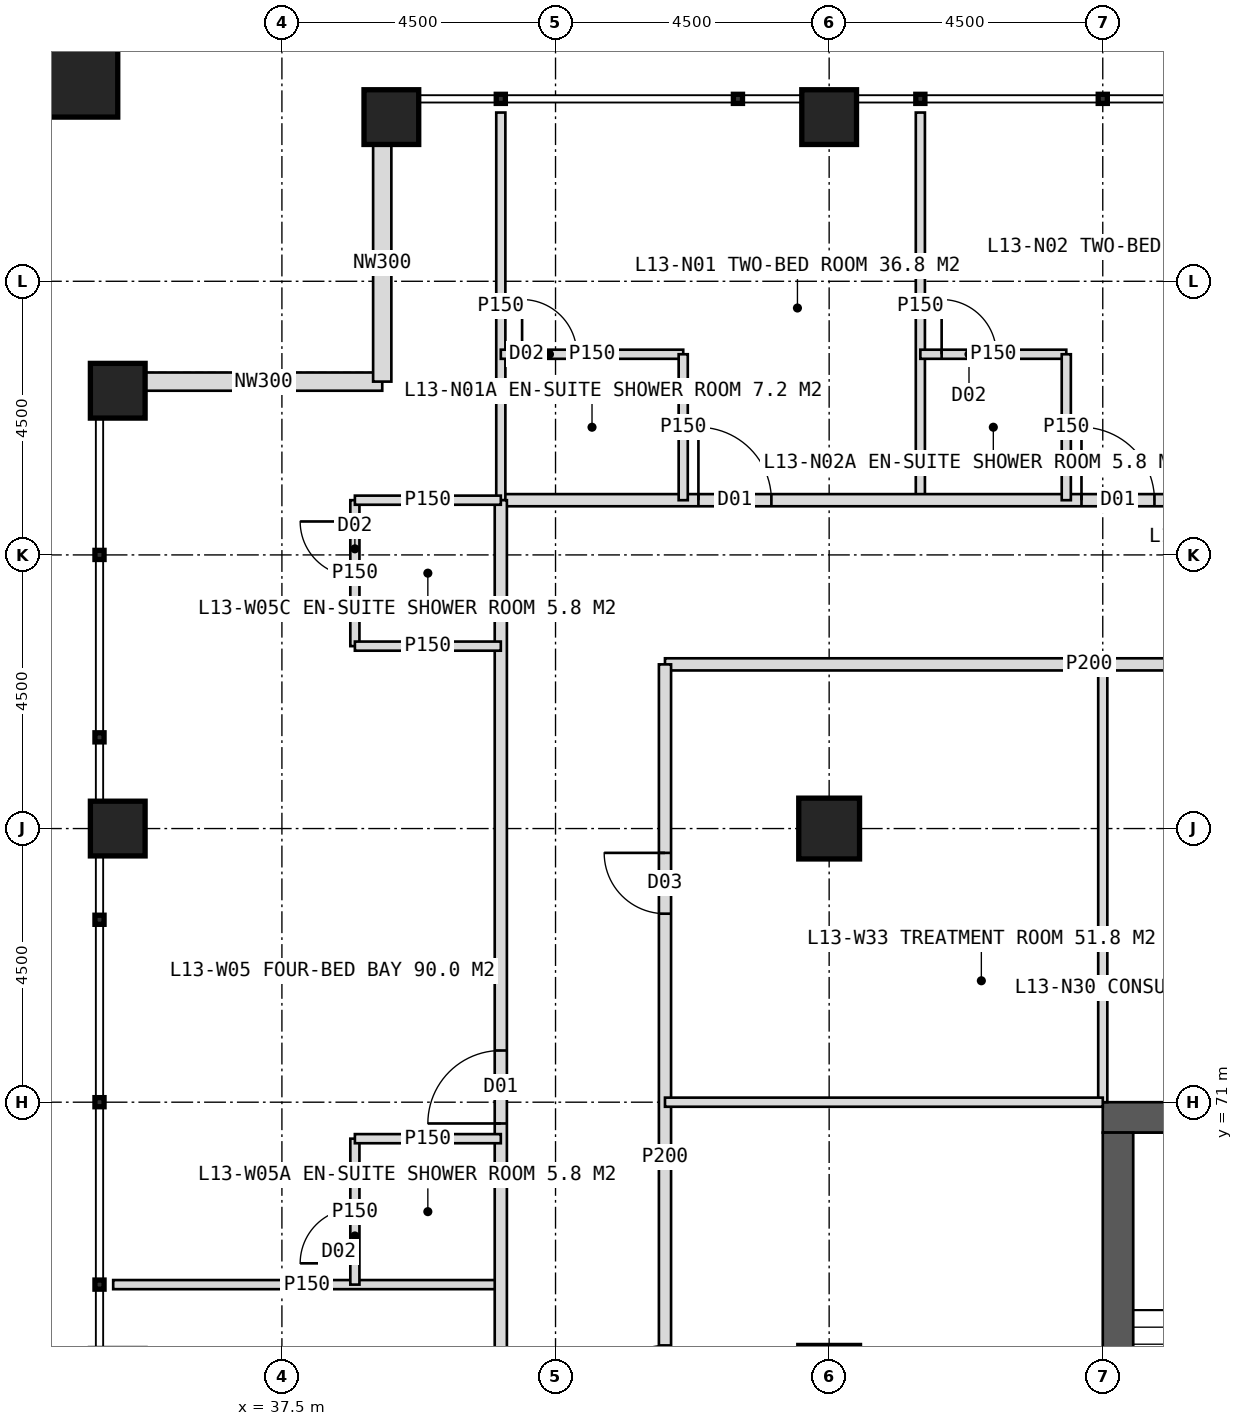
"""IFC4 building model, lengths in metres.
Left out: names, types, materials, properties, quantities, classifications, styles, units other than length and angle.
Written with IfcOpenShell. Run it as: python <this file> out.ifc"""

import sys

from ifc_helpers import new_model, si_unit, direction, frame, frame_2d, origin, origin_2d, place, context, subcontext, project, spatial, rectangle, hollow_rectangle, extrude, element, fill, save


model = new_model("IFC4")
c1 = context("Model", 3, precision=1e-05, world=origin(), true_north=direction((0.0, 1.0)))
c2 = subcontext(c1, "Body", "Model", "MODEL_VIEW")
j1 = project(units=[si_unit("LENGTHUNIT", "METRE"), si_unit("PLANEANGLEUNIT", "RADIAN")], contexts=[c1])
p1 = place(None, origin())
s1 = spatial("IfcSite", under=j1, at=p1, CompositionType="ELEMENT")
p2 = place(p1, origin())
s2 = spatial("IfcBuilding", under=s1, at=p2, CompositionType="ELEMENT")
p3 = place(p2, frame((0.0, 0.0, 59.0)))
s3 = spatial("IfcBuildingStorey", under=s2, at=p3, CompositionType="ELEMENT", Elevation=59.0)
p4 = place(p3, frame((51.0, 70.75, 0.0), z_axis=(0.0, 0.0, 1.0), x_axis=(1.0, 0.0, 0.0)))
e1 = element("IfcWall", 1, at=p4, inside=s3, PredefinedType="SHEAR", context=c2, shape_type="SweptSolid", body=[
    extrude(rectangle(XDim=18.0, YDim=0.5, at=frame_2d((9.0, 0.0))), origin(), (0.0, 0.0, 1.0), 4.0),
])
p5 = place(p4, frame((8.1, 0.0, 0.0)))
e2 = element("IfcOpeningElement", 2, at=p5, cuts=e1, PredefinedType="OPENING", context=c2, shape_type="SweptSolid", body=[
    extrude(rectangle(XDim=1.8, YDim=2.2, at=frame_2d((0.9, 1.1))), frame((0.0, 0.26, 0.0), z_axis=(0.0, -1.0, 0.0), x_axis=(1.0, 0.0, 0.0)), (0.0, 0.0, 1.0), 0.52),
])
p6 = place(p3, frame((51.25, 53.5, 0.0), z_axis=(0.0, 0.0, 1.0), x_axis=(0.0, 1.0, 0.0)))
e3 = element("IfcWall", 3, at=p6, inside=s3, PredefinedType="SHEAR", context=c2, shape_type="SweptSolid", body=[
    extrude(rectangle(XDim=17.0, YDim=0.5, at=frame_2d((8.5, 0.0))), origin(), (0.0, 0.0, 1.0), 4.0),
])
p7 = place(p6, frame((6.0, 0.0, 0.0)))
e4 = element("IfcOpeningElement", 4, at=p7, cuts=e3, PredefinedType="OPENING", context=c2, shape_type="SweptSolid", body=[
    extrude(rectangle(XDim=1.5, YDim=2.2, at=frame_2d((0.75, 1.1))), frame((0.0, 0.26, 0.0), z_axis=(0.0, -1.0, 0.0), x_axis=(1.0, 0.0, 0.0)), (0.0, 0.0, 1.0), 0.52),
])
p8 = place(p3, frame((46.5, 75.5, 0.0), z_axis=(0.0, 0.0, 1.0), x_axis=(1.0, 0.0, 0.0)))
e5 = element("IfcColumn", 5, at=p8, inside=s3, PredefinedType="COLUMN", context=c2, shape_type="SweptSolid", body=[
    extrude(hollow_rectangle(XDim=1.0, YDim=1.0, WallThickness=0.1, at=origin_2d()), origin(), (0.0, 0.0, 1.0), 4.0),
])
for number, where, z_axis, x_axis in (
    (6, (39.3, 87.2, 0.0), (0.0, 0.0, 1.0), (1.0, 0.0, 0.0)),
    (7, (46.5, 87.2, 0.0), (0.0, 0.0, 1.0), (1.0, 0.0, 0.0)),
    (8, (34.8, 75.5, 0.0), (0.0, 0.0, 1.0), (1.0, 0.0, 0.0)),
    (9, (34.8, 82.7, 0.0), (0.0, 0.0, 1.0), (1.0, 0.0, 0.0)),
):
    element("IfcColumn", number, at=place(p3, frame(where, z_axis=z_axis, x_axis=x_axis)), inside=s3, PredefinedType="COLUMN", context=c2, shape_type="SweptSolid", body=[
        extrude(hollow_rectangle(XDim=0.9, YDim=0.9, WallThickness=0.08, at=origin_2d()), origin(), (0.0, 0.0, 1.0), 4.0),
    ])
p9 = place(p3, frame((33.9, 88.1, 0.0), z_axis=(0.0, 0.0, 1.0), x_axis=(1.0, 0.0, 0.0)))
e10 = element("IfcColumn", 10, at=p9, inside=s3, PredefinedType="COLUMN", context=c2, shape_type="SweptSolid", body=[
    extrude(hollow_rectangle(XDim=1.8, YDim=1.8, WallThickness=0.1, at=origin_2d()), origin(), (0.0, 0.0, 1.0), 4.0),
])
for number, where, z_axis, x_axis in (
    (11, (35.25, 82.85, 0.0), (0.0, 0.0, 1.0), (1.0, 0.0, 0.0)),
    (12, (39.15, 82.85, 0.0), (0.0, 0.0, 1.0), (0.0, 1.0, 0.0)),
):
    element("IfcWall", number, at=place(p3, frame(where, z_axis=z_axis, x_axis=x_axis)), inside=s3, PredefinedType="ELEMENTEDWALL", context=c2, shape_type="SweptSolid", body=[
        extrude(rectangle(XDim=3.9, YDim=0.3, at=frame_2d((1.95, 0.0))), origin(), (0.0, 0.0, 1.0), 2.95),
    ])
p10 = place(p3, frame((48.0, 80.9, 0.0), z_axis=(0.0, 0.0, 1.0), x_axis=(0.0, 1.0, 0.0)))
e13 = element("IfcWall", 13, at=p10, inside=s3, PredefinedType="PARTITIONING", context=c2, shape_type="SweptSolid", body=[
    extrude(rectangle(XDim=6.375, YDim=0.15, at=frame_2d((3.188, 0.0))), origin(), (0.0, 0.0, 1.0), 3.75),
])
p11 = place(p3, frame((41.1, 80.9, 0.0), z_axis=(0.0, 0.0, 1.0), x_axis=(1.0, 0.0, 0.0)))
e14 = element("IfcWall", 14, at=p11, inside=s3, PredefinedType="PARTITIONING", context=c2, shape_type="SweptSolid", body=[
    extrude(rectangle(XDim=37.8, YDim=0.2, at=frame_2d((18.9, 0.0))), origin(), (0.0, 0.0, 1.0), 3.75),
])
p12 = place(p11, frame((3.25, 0.0, 0.0)))
e15 = element("IfcOpeningElement", 15, at=p12, cuts=e14, PredefinedType="OPENING", context=c2, shape_type="SweptSolid", body=[
    extrude(rectangle(XDim=1.2, YDim=2.2, at=frame_2d((0.6, 1.1))), frame((0.0, 0.11, 0.0), z_axis=(0.0, -1.0, 0.0), x_axis=(1.0, 0.0, 0.0)), (0.0, 0.0, 1.0), 0.22),
])
p13 = place(p11, frame((9.55, 0.0, 0.0)))
e16 = element("IfcOpeningElement", 16, at=p13, cuts=e14, PredefinedType="OPENING", context=c2, shape_type="SweptSolid", body=[
    extrude(rectangle(XDim=1.2, YDim=2.2, at=frame_2d((0.6, 1.1))), frame((0.0, 0.11, 0.0), z_axis=(0.0, -1.0, 0.0), x_axis=(1.0, 0.0, 0.0)), (0.0, 0.0, 1.0), 0.22),
])
p14 = place(p11, frame((15.55, 0.0, 0.0)))
e17 = element("IfcOpeningElement", 17, at=p14, cuts=e14, PredefinedType="OPENING", context=c2, shape_type="SweptSolid", body=[
    extrude(rectangle(XDim=1.2, YDim=2.2, at=frame_2d((0.6, 1.1))), frame((0.0, 0.11, 0.0), z_axis=(0.0, -1.0, 0.0), x_axis=(1.0, 0.0, 0.0)), (0.0, 0.0, 1.0), 0.22),
])
p15 = place(p11, frame((21.4, 0.0, 0.0)))
e18 = element("IfcOpeningElement", 18, at=p15, cuts=e14, PredefinedType="OPENING", context=c2, shape_type="SweptSolid", body=[
    extrude(rectangle(XDim=1.0, YDim=2.1, at=frame_2d((0.5, 1.05))), frame((0.0, 0.11, 0.0), z_axis=(0.0, -1.0, 0.0), x_axis=(1.0, 0.0, 0.0)), (0.0, 0.0, 1.0), 0.22),
])
p16 = place(p11, frame((27.55, 0.0, 0.0)))
e19 = element("IfcOpeningElement", 19, at=p16, cuts=e14, PredefinedType="OPENING", context=c2, shape_type="SweptSolid", body=[
    extrude(rectangle(XDim=1.2, YDim=2.2, at=frame_2d((0.6, 1.1))), frame((0.0, 0.11, 0.0), z_axis=(0.0, -1.0, 0.0), x_axis=(1.0, 0.0, 0.0)), (0.0, 0.0, 1.0), 0.22),
])
p17 = place(p3, frame((41.1, 80.9, 0.0), z_axis=(0.0, 0.0, 1.0), x_axis=(0.0, 1.0, 0.0)))
e20 = element("IfcWall", 20, at=p17, inside=s3, PredefinedType="PARTITIONING", context=c2, shape_type="SweptSolid", body=[
    extrude(rectangle(XDim=6.375, YDim=0.15, at=frame_2d((3.188, 0.0))), origin(), (0.0, 0.0, 1.0), 3.75),
])
p18 = place(p3, frame((41.1, 83.3, 0.0), z_axis=(0.0, 0.0, 1.0), x_axis=(1.0, 0.0, 0.0)))
e21 = element("IfcWall", 21, at=p18, inside=s3, PredefinedType="PARTITIONING", context=c2, shape_type="SweptSolid", body=[
    extrude(rectangle(XDim=3.0, YDim=0.15, at=frame_2d((1.5, 0.0))), origin(), (0.0, 0.0, 1.0), 3.75),
])
p19 = place(p18, frame((0.35, 0.0, 0.0)))
e22 = element("IfcOpeningElement", 22, at=p19, cuts=e21, PredefinedType="OPENING", context=c2, shape_type="SweptSolid", body=[
    extrude(rectangle(XDim=0.9, YDim=2.1, at=frame_2d((0.45, 1.05))), frame((0.0, 0.085, 0.0), z_axis=(0.0, -1.0, 0.0), x_axis=(1.0, 0.0, 0.0)), (0.0, 0.0, 1.0), 0.17),
])
p20 = place(p3, frame((44.1, 80.9, 0.0), z_axis=(0.0, 0.0, 1.0), x_axis=(0.0, 1.0, 0.0)))
e23 = element("IfcWall", 23, at=p20, inside=s3, PredefinedType="PARTITIONING", context=c2, shape_type="SweptSolid", body=[
    extrude(rectangle(XDim=2.4, YDim=0.15, at=frame_2d((1.2, 0.0))), origin(), (0.0, 0.0, 1.0), 3.75),
])
p21 = place(p3, frame((48.0, 83.3, 0.0), z_axis=(0.0, 0.0, 1.0), x_axis=(1.0, 0.0, 0.0)))
e24 = element("IfcWall", 24, at=p21, inside=s3, PredefinedType="PARTITIONING", context=c2, shape_type="SweptSolid", body=[
    extrude(rectangle(XDim=2.4, YDim=0.15, at=frame_2d((1.2, 0.0))), origin(), (0.0, 0.0, 1.0), 3.75),
])
p22 = place(p21, frame((0.35, 0.0, 0.0)))
e25 = element("IfcOpeningElement", 25, at=p22, cuts=e24, PredefinedType="OPENING", context=c2, shape_type="SweptSolid", body=[
    extrude(rectangle(XDim=0.9, YDim=2.1, at=frame_2d((0.45, 1.05))), frame((0.0, 0.085, 0.0), z_axis=(0.0, -1.0, 0.0), x_axis=(1.0, 0.0, 0.0)), (0.0, 0.0, 1.0), 0.17),
])
p23 = place(p3, frame((50.4, 80.9, 0.0), z_axis=(0.0, 0.0, 1.0), x_axis=(0.0, 1.0, 0.0)))
e26 = element("IfcWall", 26, at=p23, inside=s3, PredefinedType="PARTITIONING", context=c2, shape_type="SweptSolid", body=[
    extrude(rectangle(XDim=2.4, YDim=0.15, at=frame_2d((1.2, 0.0))), origin(), (0.0, 0.0, 1.0), 3.75),
])
p24 = place(p3, frame((51.0, 71.0, 0.0), z_axis=(0.0, 0.0, 1.0), x_axis=(0.0, 1.0, 0.0)))
e27 = element("IfcWall", 27, at=p24, inside=s3, PredefinedType="PARTITIONING", context=c2, shape_type="SweptSolid", body=[
    extrude(rectangle(XDim=7.2, YDim=0.15, at=frame_2d((3.6, 0.0))), origin(), (0.0, 0.0, 1.0), 3.75),
])
p25 = place(p3, frame((43.8, 78.2, 0.0), z_axis=(0.0, 0.0, 1.0), x_axis=(1.0, 0.0, 0.0)))
e28 = element("IfcWall", 28, at=p25, inside=s3, PredefinedType="PARTITIONING", context=c2, shape_type="SweptSolid", body=[
    extrude(rectangle(XDim=13.95, YDim=0.2, at=frame_2d((6.975, 0.0))), origin(), (0.0, 0.0, 1.0), 3.75),
])
p26 = place(p25, frame((10.075, 0.0, 0.0)))
e29 = element("IfcOpeningElement", 29, at=p26, cuts=e28, PredefinedType="OPENING", context=c2, shape_type="SweptSolid", body=[
    extrude(rectangle(XDim=1.0, YDim=2.1, at=frame_2d((0.5, 1.05))), frame((0.0, 0.11, 0.0), z_axis=(0.0, -1.0, 0.0), x_axis=(1.0, 0.0, 0.0)), (0.0, 0.0, 1.0), 0.22),
])
p27 = place(p3, frame((41.1, 68.0, 0.0), z_axis=(0.0, 0.0, 1.0), x_axis=(-1.0, 0.0, 0.0)))
e30 = element("IfcWall", 30, at=p27, inside=s3, PredefinedType="PARTITIONING", context=c2, shape_type="SweptSolid", body=[
    extrude(rectangle(XDim=6.375, YDim=0.15, at=frame_2d((3.188, 0.0))), origin(), (0.0, 0.0, 1.0), 3.75),
])
p28 = place(p3, frame((41.1, 43.1, 0.0), z_axis=(0.0, 0.0, 1.0), x_axis=(0.0, 1.0, 0.0)))
e31 = element("IfcWall", 31, at=p28, inside=s3, PredefinedType="PARTITIONING", context=c2, shape_type="SweptSolid", body=[
    extrude(rectangle(XDim=37.8, YDim=0.2, at=frame_2d((18.9, 0.0))), origin(), (0.0, 0.0, 1.0), 3.75),
])
p29 = place(p28, frame((3.25, 0.0, 0.0)))
e32 = element("IfcOpeningElement", 32, at=p29, cuts=e31, PredefinedType="OPENING", context=c2, shape_type="SweptSolid", body=[
    extrude(rectangle(XDim=1.2, YDim=2.2, at=frame_2d((0.6, 1.1))), frame((0.0, 0.11, 0.0), z_axis=(0.0, -1.0, 0.0), x_axis=(1.0, 0.0, 0.0)), (0.0, 0.0, 1.0), 0.22),
])
p30 = place(p28, frame((9.55, 0.0, 0.0)))
e33 = element("IfcOpeningElement", 33, at=p30, cuts=e31, PredefinedType="OPENING", context=c2, shape_type="SweptSolid", body=[
    extrude(rectangle(XDim=1.2, YDim=2.2, at=frame_2d((0.6, 1.1))), frame((0.0, 0.11, 0.0), z_axis=(0.0, -1.0, 0.0), x_axis=(1.0, 0.0, 0.0)), (0.0, 0.0, 1.0), 0.22),
])
p31 = place(p28, frame((15.55, 0.0, 0.0)))
e34 = element("IfcOpeningElement", 34, at=p31, cuts=e31, PredefinedType="OPENING", context=c2, shape_type="SweptSolid", body=[
    extrude(rectangle(XDim=1.2, YDim=2.2, at=frame_2d((0.6, 1.1))), frame((0.0, 0.11, 0.0), z_axis=(0.0, -1.0, 0.0), x_axis=(1.0, 0.0, 0.0)), (0.0, 0.0, 1.0), 0.22),
])
p32 = place(p28, frame((21.55, 0.0, 0.0)))
e35 = element("IfcOpeningElement", 35, at=p32, cuts=e31, PredefinedType="OPENING", context=c2, shape_type="SweptSolid", body=[
    extrude(rectangle(XDim=1.2, YDim=2.2, at=frame_2d((0.6, 1.1))), frame((0.0, 0.11, 0.0), z_axis=(0.0, -1.0, 0.0), x_axis=(1.0, 0.0, 0.0)), (0.0, 0.0, 1.0), 0.22),
])
p33 = place(p28, frame((27.55, 0.0, 0.0)))
e36 = element("IfcOpeningElement", 36, at=p33, cuts=e31, PredefinedType="OPENING", context=c2, shape_type="SweptSolid", body=[
    extrude(rectangle(XDim=1.2, YDim=2.2, at=frame_2d((0.6, 1.1))), frame((0.0, 0.11, 0.0), z_axis=(0.0, -1.0, 0.0), x_axis=(1.0, 0.0, 0.0)), (0.0, 0.0, 1.0), 0.22),
])
p34 = place(p3, frame((38.7, 68.0, 0.0), z_axis=(0.0, 0.0, 1.0), x_axis=(0.0, 1.0, 0.0)))
e37 = element("IfcWall", 37, at=p34, inside=s3, PredefinedType="PARTITIONING", context=c2, shape_type="SweptSolid", body=[
    extrude(rectangle(XDim=2.4, YDim=0.15, at=frame_2d((1.2, 0.0))), origin(), (0.0, 0.0, 1.0), 3.75),
])
p35 = place(p34, frame((0.35, 0.0, 0.0)))
e38 = element("IfcOpeningElement", 38, at=p35, cuts=e37, PredefinedType="OPENING", context=c2, shape_type="SweptSolid", body=[
    extrude(rectangle(XDim=0.9, YDim=2.1, at=frame_2d((0.45, 1.05))), frame((0.0, 0.085, 0.0), z_axis=(0.0, -1.0, 0.0), x_axis=(1.0, 0.0, 0.0)), (0.0, 0.0, 1.0), 0.17),
])
p36 = place(p3, frame((41.1, 70.4, 0.0), z_axis=(0.0, 0.0, 1.0), x_axis=(-1.0, 0.0, 0.0)))
e39 = element("IfcWall", 39, at=p36, inside=s3, PredefinedType="PARTITIONING", context=c2, shape_type="SweptSolid", body=[
    extrude(rectangle(XDim=2.4, YDim=0.15, at=frame_2d((1.2, 0.0))), origin(), (0.0, 0.0, 1.0), 3.75),
])
p37 = place(p3, frame((38.7, 78.5, 0.0), z_axis=(0.0, 0.0, 1.0), x_axis=(0.0, 1.0, 0.0)))
e40 = element("IfcWall", 40, at=p37, inside=s3, PredefinedType="PARTITIONING", context=c2, shape_type="SweptSolid", body=[
    extrude(rectangle(XDim=2.4, YDim=0.15, at=frame_2d((1.2, 0.0))), origin(), (0.0, 0.0, 1.0), 3.75),
])
p38 = place(p37, frame((1.15, 0.0, 0.0)))
e41 = element("IfcOpeningElement", 41, at=p38, cuts=e40, PredefinedType="OPENING", context=c2, shape_type="SweptSolid", body=[
    extrude(rectangle(XDim=0.9, YDim=2.1, at=frame_2d((0.45, 1.05))), frame((0.0, 0.085, 0.0), z_axis=(0.0, -1.0, 0.0), x_axis=(1.0, 0.0, 0.0)), (0.0, 0.0, 1.0), 0.17),
])
for number, where, z_axis, x_axis in (
    (42, (41.1, 78.5, 0.0), (0.0, 0.0, 1.0), (-1.0, 0.0, 0.0)),
    (43, (41.1, 80.9, 0.0), (0.0, 0.0, 1.0), (-1.0, 0.0, 0.0)),
):
    element("IfcWall", number, at=place(p3, frame(where, z_axis=z_axis, x_axis=x_axis)), inside=s3, PredefinedType="PARTITIONING", context=c2, shape_type="SweptSolid", body=[
        extrude(rectangle(XDim=2.4, YDim=0.15, at=frame_2d((1.2, 0.0))), origin(), (0.0, 0.0, 1.0), 3.75),
    ])
p39 = place(p3, frame((43.8, 62.0, 0.0), z_axis=(0.0, 0.0, 1.0), x_axis=(0.0, 1.0, 0.0)))
e44 = element("IfcWall", 44, at=p39, inside=s3, PredefinedType="PARTITIONING", context=c2, shape_type="SweptSolid", body=[
    extrude(rectangle(XDim=16.2, YDim=0.2, at=frame_2d((8.1, 0.0))), origin(), (0.0, 0.0, 1.0), 3.75),
])
p40 = place(p39, frame((4.0, 0.0, 0.0)))
e45 = element("IfcOpeningElement", 45, at=p40, cuts=e44, PredefinedType="OPENING", context=c2, shape_type="SweptSolid", body=[
    extrude(rectangle(XDim=1.0, YDim=2.1, at=frame_2d((0.5, 1.05))), frame((0.0, 0.11, 0.0), z_axis=(0.0, -1.0, 0.0), x_axis=(1.0, 0.0, 0.0)), (0.0, 0.0, 1.0), 0.22),
])
p41 = place(p39, frame((12.1, 0.0, 0.0)))
e46 = element("IfcOpeningElement", 46, at=p41, cuts=e44, PredefinedType="OPENING", context=c2, shape_type="SweptSolid", body=[
    extrude(rectangle(XDim=1.0, YDim=2.1, at=frame_2d((0.5, 1.05))), frame((0.0, 0.11, 0.0), z_axis=(0.0, -1.0, 0.0), x_axis=(1.0, 0.0, 0.0)), (0.0, 0.0, 1.0), 0.22),
])
p42 = place(p3, frame((51.0, 71.0, 0.0), z_axis=(0.0, 0.0, 1.0), x_axis=(-1.0, 0.0, 0.0)))
e47 = element("IfcWall", 47, at=p42, inside=s3, PredefinedType="PARTITIONING", context=c2, shape_type="SweptSolid", body=[
    extrude(rectangle(XDim=7.2, YDim=0.15, at=frame_2d((3.6, 0.0))), origin(), (0.0, 0.0, 1.0), 3.75),
])
p43 = place(p12, origin())
e48 = element("IfcDoor", 48, at=p43, inside=s3, OperationType="SINGLE_SWING_LEFT", PredefinedType="DOOR", context=c2, shape_type="SweptSolid", body=[
    extrude(rectangle(XDim=1.2, YDim=2.2, at=frame_2d((0.6, 1.1))), frame((0.0, 0.025, 0.0), z_axis=(0.0, -1.0, 0.0), x_axis=(1.0, 0.0, 0.0)), (0.0, 0.0, 1.0), 0.05),
])
fill(e15, e48)
p44 = place(p19, origin())
e49 = element("IfcDoor", 49, at=p44, inside=s3, OperationType="SINGLE_SWING_LEFT", PredefinedType="DOOR", context=c2, shape_type="SweptSolid", body=[
    extrude(rectangle(XDim=0.9, YDim=2.1, at=frame_2d((0.45, 1.05))), frame((0.0, 0.025, 0.0), z_axis=(0.0, -1.0, 0.0), x_axis=(1.0, 0.0, 0.0)), (0.0, 0.0, 1.0), 0.05),
])
fill(e22, e49)
p45 = place(p13, origin())
e50 = element("IfcDoor", 50, at=p45, inside=s3, OperationType="SINGLE_SWING_LEFT", PredefinedType="DOOR", context=c2, shape_type="SweptSolid", body=[
    extrude(rectangle(XDim=1.2, YDim=2.2, at=frame_2d((0.6, 1.1))), frame((0.0, 0.025, 0.0), z_axis=(0.0, -1.0, 0.0), x_axis=(1.0, 0.0, 0.0)), (0.0, 0.0, 1.0), 0.05),
])
fill(e16, e50)
p46 = place(p22, origin())
e51 = element("IfcDoor", 51, at=p46, inside=s3, OperationType="SINGLE_SWING_LEFT", PredefinedType="DOOR", context=c2, shape_type="SweptSolid", body=[
    extrude(rectangle(XDim=0.9, YDim=2.1, at=frame_2d((0.45, 1.05))), frame((0.0, 0.025, 0.0), z_axis=(0.0, -1.0, 0.0), x_axis=(1.0, 0.0, 0.0)), (0.0, 0.0, 1.0), 0.05),
])
fill(e25, e51)
p47 = place(p33, origin())
e52 = element("IfcDoor", 52, at=p47, inside=s3, OperationType="SINGLE_SWING_LEFT", PredefinedType="DOOR", context=c2, shape_type="SweptSolid", body=[
    extrude(rectangle(XDim=1.2, YDim=2.2, at=frame_2d((0.6, 1.1))), frame((0.0, 0.025, 0.0), z_axis=(0.0, -1.0, 0.0), x_axis=(1.0, 0.0, 0.0)), (0.0, 0.0, 1.0), 0.05),
])
fill(e36, e52)
p48 = place(p35, origin())
e53 = element("IfcDoor", 53, at=p48, inside=s3, OperationType="SINGLE_SWING_LEFT", PredefinedType="DOOR", context=c2, shape_type="SweptSolid", body=[
    extrude(rectangle(XDim=0.9, YDim=2.1, at=frame_2d((0.45, 1.05))), frame((0.0, 0.025, 0.0), z_axis=(0.0, -1.0, 0.0), x_axis=(1.0, 0.0, 0.0)), (0.0, 0.0, 1.0), 0.05),
])
fill(e38, e53)
p49 = place(p38, origin())
e54 = element("IfcDoor", 54, at=p49, inside=s3, OperationType="SINGLE_SWING_RIGHT", PredefinedType="DOOR", context=c2, shape_type="SweptSolid", body=[
    extrude(rectangle(XDim=0.9, YDim=2.1, at=frame_2d((0.45, 1.05))), frame((0.0, 0.025, 0.0), z_axis=(0.0, -1.0, 0.0), x_axis=(1.0, 0.0, 0.0)), (0.0, 0.0, 1.0), 0.05),
])
fill(e41, e54)
p50 = place(p41, origin())
e55 = element("IfcDoor", 55, at=p50, inside=s3, OperationType="SINGLE_SWING_RIGHT", PredefinedType="DOOR", context=c2, shape_type="SweptSolid", body=[
    extrude(rectangle(XDim=1.0, YDim=2.1, at=frame_2d((0.5, 1.05))), frame((0.0, 0.025, 0.0), z_axis=(0.0, -1.0, 0.0), x_axis=(1.0, 0.0, 0.0)), (0.0, 0.0, 1.0), 0.05),
])
fill(e46, e55)
save(model, sys.argv[1])
